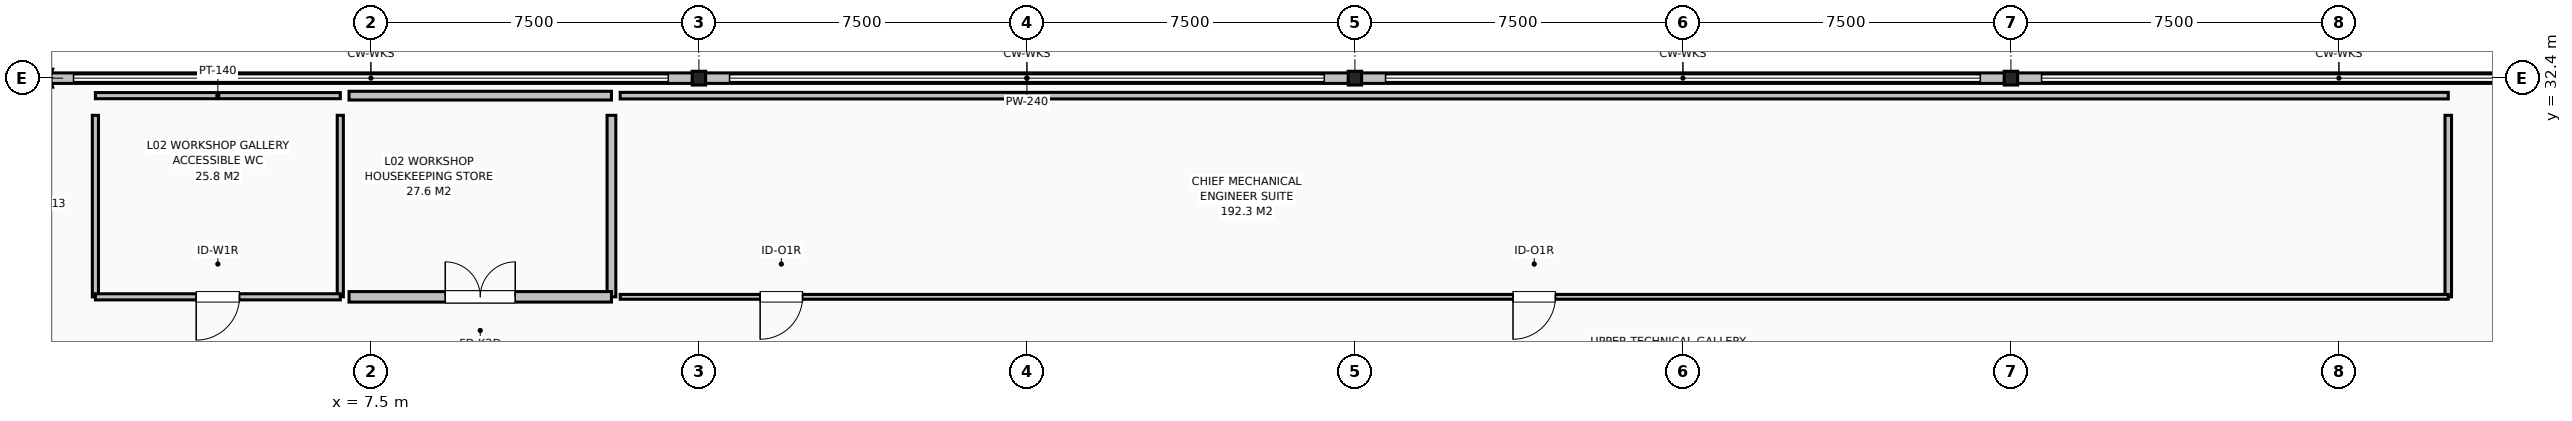
"""IFC4 building model, lengths in metres.
Left out: names, types, materials, properties, quantities, classifications, styles, units other than length and angle.
Written with IfcOpenShell. Run it as: python <this file> out.ifc"""

import sys

from ifc_helpers import new_model, si_unit, direction, frame, frame_2d, origin, origin_2d, place, context, subcontext, project, spatial, rectangle, i_section, extrude, element, fill, save


model = new_model("IFC4")
c1 = context("Model", 3, precision=1e-05, world=origin(), true_north=direction((0.0, 1.0)))
c2 = subcontext(c1, "Body", "Model", "MODEL_VIEW")
j1 = project(units=[si_unit("LENGTHUNIT", "METRE"), si_unit("PLANEANGLEUNIT", "RADIAN")], contexts=[c1])
p1 = place(None, origin())
s1 = spatial("IfcSite", under=j1, at=p1, CompositionType="ELEMENT")
p2 = place(p1, origin())
s2 = spatial("IfcBuilding", under=s1, at=p2, CompositionType="ELEMENT")
p3 = place(p2, frame((0.0, 0.0, 9.0)))
s3 = spatial("IfcBuildingStorey", under=s2, at=p3, CompositionType="ELEMENT", Elevation=9.0)
for number, where, z_axis, x_axis in (
    (1, (15.0, 32.4, 0.0), (0.0, 0.0, 1.0), (1.0, 0.0, 0.0)),
    (2, (30.0, 32.4, 0.0), (0.0, 0.0, 1.0), (1.0, 0.0, 0.0)),
    (3, (45.0, 32.4, 0.0), (0.0, 0.0, 1.0), (1.0, 0.0, 0.0)),
):
    element("IfcColumn", number, at=place(p3, frame(where, z_axis=z_axis, x_axis=x_axis)), inside=s3, PredefinedType="COLUMN", context=c2, shape_type="SweptSolid", body=[
        extrude(i_section(OverallWidth=0.307, OverallDepth=0.315, WebThickness=0.012, FlangeThickness=0.019, at=origin_2d()), origin(), (0.0, 0.0, 1.0), 4.2),
    ])
p4 = place(p3, frame((0.0, 32.4, 0.0), z_axis=(0.0, 0.0, 1.0), x_axis=(1.0, 0.0, 0.0)))
e4 = element("IfcWall", 4, at=p4, inside=s3, PredefinedType="PARAPET", context=c2, shape_type="SweptSolid", body=[
    extrude(rectangle(XDim=45.0, YDim=0.24, at=frame_2d((22.5, 0.0))), origin(), (0.0, 0.0, 1.0), 1.15),
])
p5 = place(p3, frame((45.0, 32.4, 0.0), z_axis=(0.0, 0.0, 1.0), x_axis=(1.0, 0.0, 0.0)))
e5 = element("IfcWall", 5, at=p5, inside=s3, PredefinedType="PARAPET", context=c2, shape_type="SweptSolid", body=[
    extrude(rectangle(XDim=48.6, YDim=0.24, at=frame_2d((24.3, 0.0))), origin(), (0.0, 0.0, 1.0), 1.15),
])
p6 = place(p3, frame((1.2, 32.0, 0.0), z_axis=(0.0, 0.0, 1.0), x_axis=(1.0, 0.0, 0.0)))
e6 = element("IfcWall", 6, at=p6, inside=s3, PredefinedType="PARTITIONING", context=c2, shape_type="SweptSolid", body=[
    extrude(rectangle(XDim=5.6, YDim=0.14, at=frame_2d((2.8, 0.0))), origin(), (0.0, 0.0, 1.0), 3.5),
])
for number, where, z_axis, x_axis in (
    (7, (6.8, 27.4, 0.0), (0.0, 0.0, 1.0), (0.0, 1.0, 0.0)),
    (8, (1.2, 31.55, 0.0), (0.0, 0.0, 1.0), (0.0, -1.0, 0.0)),
):
    element("IfcWall", number, at=place(p3, frame(where, z_axis=z_axis, x_axis=x_axis)), inside=s3, PredefinedType="PARTITIONING", context=c2, shape_type="SweptSolid", body=[
        extrude(rectangle(XDim=4.15, YDim=0.14, at=frame_2d((2.075, 0.0))), origin(), (0.0, 0.0, 1.0), 3.5),
    ])
p7 = place(p3, frame((6.8, 27.4, 0.0), z_axis=(0.0, 0.0, 1.0), x_axis=(-1.0, 0.0, 0.0)))
e9 = element("IfcWall", 9, at=p7, inside=s3, PredefinedType="PARTITIONING", context=c2, shape_type="SweptSolid", body=[
    extrude(rectangle(XDim=5.6, YDim=0.14, at=frame_2d((2.8, 0.0))), origin(), (0.0, 0.0, 1.0), 3.5),
])
p8 = place(p7, frame((2.305, 0.0, 0.0)))
e10 = element("IfcOpeningElement", 10, at=p8, cuts=e9, PredefinedType="OPENING", context=c2, shape_type="SweptSolid", body=[
    extrude(rectangle(XDim=0.99, YDim=2.15, at=frame_2d((0.495, 1.075))), frame((0.0, 0.08, 0.0), z_axis=(0.0, -1.0, 0.0), x_axis=(1.0, 0.0, 0.0)), (0.0, 0.0, 1.0), 0.16),
])
p9 = place(p3, frame((7.0, 32.0, 0.0), z_axis=(0.0, 0.0, 1.0), x_axis=(1.0, 0.0, 0.0)))
e11 = element("IfcWall", 11, at=p9, inside=s3, PredefinedType="SOLIDWALL", context=c2, shape_type="SweptSolid", body=[
    extrude(rectangle(XDim=6.0, YDim=0.2, at=frame_2d((3.0, 0.0))), origin(), (0.0, 0.0, 1.0), 3.5),
])
p10 = place(p3, frame((13.0, 27.4, 0.0), z_axis=(0.0, 0.0, 1.0), x_axis=(0.0, 1.0, 0.0)))
e12 = element("IfcWall", 12, at=p10, inside=s3, PredefinedType="SOLIDWALL", context=c2, shape_type="SweptSolid", body=[
    extrude(rectangle(XDim=4.15, YDim=0.2, at=frame_2d((2.075, 0.0))), origin(), (0.0, 0.0, 1.0), 3.5),
])
p11 = place(p3, frame((13.0, 27.4, 0.0), z_axis=(0.0, 0.0, 1.0), x_axis=(-1.0, 0.0, 0.0)))
e13 = element("IfcWall", 13, at=p11, inside=s3, PredefinedType="SOLIDWALL", context=c2, shape_type="SweptSolid", body=[
    extrude(rectangle(XDim=6.0, YDim=0.24, at=frame_2d((3.0, 0.0))), origin(), (0.0, 0.0, 1.0), 3.5),
])
p12 = place(p11, frame((2.2, 0.0, 0.0)))
e14 = element("IfcOpeningElement", 14, at=p12, cuts=e13, PredefinedType="OPENING", context=c2, shape_type="SweptSolid", body=[
    extrude(rectangle(XDim=1.6, YDim=2.15, at=frame_2d((0.8, 1.075))), frame((0.0, 0.13, 0.0), z_axis=(0.0, -1.0, 0.0), x_axis=(1.0, 0.0, 0.0)), (0.0, 0.0, 1.0), 0.26),
])
p13 = place(p3, frame((13.2, 32.0, 0.0), z_axis=(0.0, 0.0, 1.0), x_axis=(1.0, 0.0, 0.0)))
e15 = element("IfcWall", 15, at=p13, inside=s3, PredefinedType="PARTITIONING", context=c2, shape_type="SweptSolid", body=[
    extrude(rectangle(XDim=41.8, YDim=0.15, at=frame_2d((20.9, 0.0))), origin(), (0.0, 0.0, 1.0), 3.287),
])
p14 = place(p3, frame((55.0, 27.4, 0.0), z_axis=(0.0, 0.0, 1.0), x_axis=(0.0, 1.0, 0.0)))
e16 = element("IfcWall", 16, at=p14, inside=s3, PredefinedType="PARTITIONING", context=c2, shape_type="SweptSolid", body=[
    extrude(rectangle(XDim=4.15, YDim=0.15, at=frame_2d((2.075, 0.0))), origin(), (0.0, 0.0, 1.0), 3.6),
])
p15 = place(p3, frame((55.0, 27.4, 0.0), z_axis=(0.0, 0.0, 1.0), x_axis=(-1.0, 0.0, 0.0)))
e17 = element("IfcWall", 17, at=p15, inside=s3, PredefinedType="PARTITIONING", context=c2, shape_type="SweptSolid", body=[
    extrude(rectangle(XDim=41.8, YDim=0.11, at=frame_2d((20.9, 0.0))), origin(), (0.0, 0.0, 1.0), 3.287),
])
p16 = place(p15, frame((20.415, 0.0, 0.0)))
e18 = element("IfcOpeningElement", 18, at=p16, cuts=e17, PredefinedType="OPENING", context=c2, shape_type="SweptSolid", body=[
    extrude(rectangle(XDim=0.97, YDim=2.15, at=frame_2d((0.485, 1.075))), frame((0.0, 0.065, 0.0), z_axis=(0.0, -1.0, 0.0), x_axis=(1.0, 0.0, 0.0)), (0.0, 0.0, 1.0), 0.13),
])
p17 = place(p15, frame((37.63, 0.0, 0.0)))
e19 = element("IfcOpeningElement", 19, at=p17, cuts=e17, PredefinedType="OPENING", context=c2, shape_type="SweptSolid", body=[
    extrude(rectangle(XDim=0.97, YDim=2.15, at=frame_2d((0.485, 1.075))), frame((0.0, 0.065, 0.0), z_axis=(0.0, -1.0, 0.0), x_axis=(1.0, 0.0, 0.0)), (0.0, 0.0, 1.0), 0.13),
])
p18 = place(p8, origin())
e20 = element("IfcDoor", 20, at=p18, inside=s3, OperationType="SINGLE_SWING_RIGHT", PredefinedType="DOOR", context=c2, shape_type="SweptSolid", body=[
    extrude(rectangle(XDim=0.99, YDim=2.15, at=frame_2d((0.495, 1.075))), frame((0.0, 0.025, 0.0), z_axis=(0.0, -1.0, 0.0), x_axis=(1.0, 0.0, 0.0)), (0.0, 0.0, 1.0), 0.05),
])
fill(e10, e20)
p19 = place(p12, origin())
e21 = element("IfcDoor", 21, at=p19, inside=s3, OperationType="DOUBLE_SWING_RIGHT", PredefinedType="DOOR", context=c2, shape_type="SweptSolid", body=[
    extrude(rectangle(XDim=1.6, YDim=2.15, at=frame_2d((0.8, 1.075))), frame((0.0, 0.025, 0.0), z_axis=(0.0, -1.0, 0.0), x_axis=(1.0, 0.0, 0.0)), (0.0, 0.0, 1.0), 0.05),
])
fill(e14, e21)
p20 = place(p16, origin())
e22 = element("IfcDoor", 22, at=p20, inside=s3, OperationType="SINGLE_SWING_RIGHT", PredefinedType="DOOR", context=c2, shape_type="SweptSolid", body=[
    extrude(rectangle(XDim=0.97, YDim=2.15, at=frame_2d((0.485, 1.075))), frame((0.0, 0.025, 0.0), z_axis=(0.0, -1.0, 0.0), x_axis=(1.0, 0.0, 0.0)), (0.0, 0.0, 1.0), 0.05),
])
fill(e18, e22)
p21 = place(p17, origin())
e23 = element("IfcDoor", 23, at=p21, inside=s3, OperationType="SINGLE_SWING_RIGHT", PredefinedType="DOOR", context=c2, shape_type="SweptSolid", body=[
    extrude(rectangle(XDim=0.97, YDim=2.15, at=frame_2d((0.485, 1.075))), frame((0.0, 0.025, 0.0), z_axis=(0.0, -1.0, 0.0), x_axis=(1.0, 0.0, 0.0)), (0.0, 0.0, 1.0), 0.05),
])
fill(e19, e23)
save(model, sys.argv[1])
